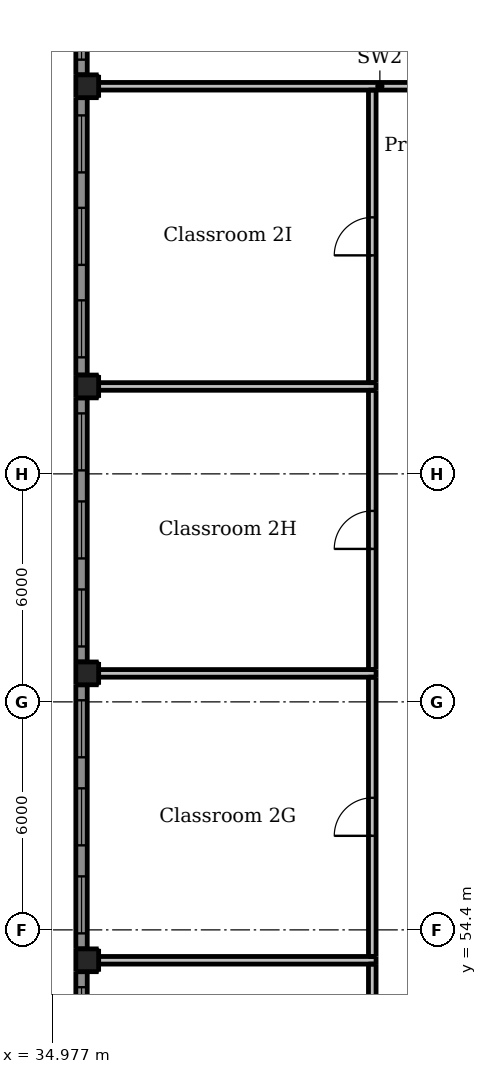
"""IFC4 building model, lengths in metres.
Left out: names, types, materials, properties, quantities, classifications, styles, units other than length and angle.
Written with IfcOpenShell. Run it as: python <this file> out.ifc"""

import sys

from ifc_helpers import new_model, si_unit, direction, frame, frame_2d, origin, origin_2d, place, context, subcontext, project, spatial, rectangle, extrude, element, fill, save


model = new_model("IFC4")
c1 = context("Model", 3, precision=1e-05, world=origin(), true_north=direction((0.0, 1.0)))
c2 = subcontext(c1, "Body", "Model", "MODEL_VIEW")
j1 = project(units=[si_unit("LENGTHUNIT", "METRE"), si_unit("PLANEANGLEUNIT", "RADIAN")], contexts=[c1])
p1 = place(None, origin())
s1 = spatial("IfcSite", under=j1, at=p1, CompositionType="ELEMENT")
p2 = place(p1, origin())
s2 = spatial("IfcBuilding", under=s1, at=p2, CompositionType="ELEMENT")
p3 = place(p2, frame((0.0, 0.0, 10.0)))
s3 = spatial("IfcBuildingStorey", under=s2, at=p3, CompositionType="ELEMENT", Elevation=10.0)
for number, where, z_axis, x_axis in (
    (1, (35.9, 53.6, -0.3), (0.0, 0.0, 1.0), (1.0, 0.0, 0.0)),
    (2, (35.9, 61.15, -0.3), (0.0, 0.0, 1.0), (1.0, 0.0, 0.0)),
    (3, (35.9, 68.7, -0.3), (0.0, 0.0, 1.0), (1.0, 0.0, 0.0)),
    (4, (35.9, 76.6, -0.3), (0.0, 0.0, 1.0), (1.0, 0.0, 0.0)),
):
    element("IfcColumn", number, at=place(p3, frame(where, z_axis=z_axis, x_axis=x_axis)), inside=s3, PredefinedType="COLUMN", context=c2, shape_type="SweptSolid", body=[
        extrude(rectangle(XDim=0.6, YDim=0.6, at=origin_2d()), origin(), (0.0, 0.0, 1.0), 4.5),
    ])
p4 = place(p3, frame((35.75, 46.35, 0.0), z_axis=(0.0, 0.0, 1.0), x_axis=(0.0, 1.0, 0.0)))
e5 = element("IfcWall", 5, at=p4, inside=s3, PredefinedType="SOLIDWALL", context=c2, shape_type="SweptSolid", body=[
    extrude(rectangle(XDim=6.95, YDim=0.3, at=frame_2d((3.475, 0.0))), origin(), (0.0, 0.0, 1.0), 3.3),
])
p5 = place(p4, frame((0.408, 0.0, 0.9)))
e6 = element("IfcOpeningElement", 6, at=p5, cuts=e5, PredefinedType="OPENING", context=c2, shape_type="SweptSolid", body=[
    extrude(rectangle(XDim=1.5, YDim=1.5, at=frame_2d((0.75, 0.75))), frame((0.0, 0.16, 0.0), z_axis=(0.0, -1.0, 0.0), x_axis=(1.0, 0.0, 0.0)), (0.0, 0.0, 1.0), 0.32),
])
p6 = place(p4, frame((2.725, 0.0, 0.9)))
e7 = element("IfcOpeningElement", 7, at=p6, cuts=e5, PredefinedType="OPENING", context=c2, shape_type="SweptSolid", body=[
    extrude(rectangle(XDim=1.5, YDim=1.5, at=frame_2d((0.75, 0.75))), frame((0.0, 0.16, 0.0), z_axis=(0.0, -1.0, 0.0), x_axis=(1.0, 0.0, 0.0)), (0.0, 0.0, 1.0), 0.32),
])
p7 = place(p4, frame((5.042, 0.0, 0.9)))
e8 = element("IfcOpeningElement", 8, at=p7, cuts=e5, PredefinedType="OPENING", context=c2, shape_type="SweptSolid", body=[
    extrude(rectangle(XDim=1.5, YDim=1.5, at=frame_2d((0.75, 0.75))), frame((0.0, 0.16, 0.0), z_axis=(0.0, -1.0, 0.0), x_axis=(1.0, 0.0, 0.0)), (0.0, 0.0, 1.0), 0.32),
])
p8 = place(p3, frame((35.75, 53.9, 0.0), z_axis=(0.0, 0.0, 1.0), x_axis=(0.0, 1.0, 0.0)))
e9 = element("IfcWall", 9, at=p8, inside=s3, PredefinedType="SOLIDWALL", context=c2, shape_type="SweptSolid", body=[
    extrude(rectangle(XDim=6.95, YDim=0.3, at=frame_2d((3.475, 0.0))), origin(), (0.0, 0.0, 1.0), 3.3),
])
p9 = place(p8, frame((0.408, 0.0, 0.9)))
e10 = element("IfcOpeningElement", 10, at=p9, cuts=e9, PredefinedType="OPENING", context=c2, shape_type="SweptSolid", body=[
    extrude(rectangle(XDim=1.5, YDim=1.5, at=frame_2d((0.75, 0.75))), frame((0.0, 0.16, 0.0), z_axis=(0.0, -1.0, 0.0), x_axis=(1.0, 0.0, 0.0)), (0.0, 0.0, 1.0), 0.32),
])
p10 = place(p8, frame((2.725, 0.0, 0.9)))
e11 = element("IfcOpeningElement", 11, at=p10, cuts=e9, PredefinedType="OPENING", context=c2, shape_type="SweptSolid", body=[
    extrude(rectangle(XDim=1.5, YDim=1.5, at=frame_2d((0.75, 0.75))), frame((0.0, 0.16, 0.0), z_axis=(0.0, -1.0, 0.0), x_axis=(1.0, 0.0, 0.0)), (0.0, 0.0, 1.0), 0.32),
])
p11 = place(p8, frame((5.042, 0.0, 0.9)))
e12 = element("IfcOpeningElement", 12, at=p11, cuts=e9, PredefinedType="OPENING", context=c2, shape_type="SweptSolid", body=[
    extrude(rectangle(XDim=1.5, YDim=1.5, at=frame_2d((0.75, 0.75))), frame((0.0, 0.16, 0.0), z_axis=(0.0, -1.0, 0.0), x_axis=(1.0, 0.0, 0.0)), (0.0, 0.0, 1.0), 0.32),
])
p12 = place(p3, frame((35.75, 61.45, 0.0), z_axis=(0.0, 0.0, 1.0), x_axis=(0.0, 1.0, 0.0)))
e13 = element("IfcWall", 13, at=p12, inside=s3, PredefinedType="SOLIDWALL", context=c2, shape_type="SweptSolid", body=[
    extrude(rectangle(XDim=6.95, YDim=0.3, at=frame_2d((3.475, 0.0))), origin(), (0.0, 0.0, 1.0), 3.3),
])
p13 = place(p12, frame((0.408, 0.0, 0.9)))
e14 = element("IfcOpeningElement", 14, at=p13, cuts=e13, PredefinedType="OPENING", context=c2, shape_type="SweptSolid", body=[
    extrude(rectangle(XDim=1.5, YDim=1.5, at=frame_2d((0.75, 0.75))), frame((0.0, 0.16, 0.0), z_axis=(0.0, -1.0, 0.0), x_axis=(1.0, 0.0, 0.0)), (0.0, 0.0, 1.0), 0.32),
])
p14 = place(p12, frame((2.725, 0.0, 0.9)))
e15 = element("IfcOpeningElement", 15, at=p14, cuts=e13, PredefinedType="OPENING", context=c2, shape_type="SweptSolid", body=[
    extrude(rectangle(XDim=1.5, YDim=1.5, at=frame_2d((0.75, 0.75))), frame((0.0, 0.16, 0.0), z_axis=(0.0, -1.0, 0.0), x_axis=(1.0, 0.0, 0.0)), (0.0, 0.0, 1.0), 0.32),
])
p15 = place(p12, frame((5.042, 0.0, 0.9)))
e16 = element("IfcOpeningElement", 16, at=p15, cuts=e13, PredefinedType="OPENING", context=c2, shape_type="SweptSolid", body=[
    extrude(rectangle(XDim=1.5, YDim=1.5, at=frame_2d((0.75, 0.75))), frame((0.0, 0.16, 0.0), z_axis=(0.0, -1.0, 0.0), x_axis=(1.0, 0.0, 0.0)), (0.0, 0.0, 1.0), 0.32),
])
p16 = place(p3, frame((35.75, 69.0, 0.0), z_axis=(0.0, 0.0, 1.0), x_axis=(0.0, 1.0, 0.0)))
e17 = element("IfcWall", 17, at=p16, inside=s3, PredefinedType="SOLIDWALL", context=c2, shape_type="SweptSolid", body=[
    extrude(rectangle(XDim=7.3, YDim=0.3, at=frame_2d((3.65, 0.0))), origin(), (0.0, 0.0, 1.0), 3.3),
])
p17 = place(p16, frame((0.467, 0.0, 0.9)))
e18 = element("IfcOpeningElement", 18, at=p17, cuts=e17, PredefinedType="OPENING", context=c2, shape_type="SweptSolid", body=[
    extrude(rectangle(XDim=1.5, YDim=1.5, at=frame_2d((0.75, 0.75))), frame((0.0, 0.16, 0.0), z_axis=(0.0, -1.0, 0.0), x_axis=(1.0, 0.0, 0.0)), (0.0, 0.0, 1.0), 0.32),
])
p18 = place(p16, frame((2.9, 0.0, 0.9)))
e19 = element("IfcOpeningElement", 19, at=p18, cuts=e17, PredefinedType="OPENING", context=c2, shape_type="SweptSolid", body=[
    extrude(rectangle(XDim=1.5, YDim=1.5, at=frame_2d((0.75, 0.75))), frame((0.0, 0.16, 0.0), z_axis=(0.0, -1.0, 0.0), x_axis=(1.0, 0.0, 0.0)), (0.0, 0.0, 1.0), 0.32),
])
p19 = place(p16, frame((5.333, 0.0, 0.9)))
e20 = element("IfcOpeningElement", 20, at=p19, cuts=e17, PredefinedType="OPENING", context=c2, shape_type="SweptSolid", body=[
    extrude(rectangle(XDim=1.5, YDim=1.5, at=frame_2d((0.75, 0.75))), frame((0.0, 0.16, 0.0), z_axis=(0.0, -1.0, 0.0), x_axis=(1.0, 0.0, 0.0)), (0.0, 0.0, 1.0), 0.32),
])
p20 = place(p3, frame((35.75, 76.9, 0.0), z_axis=(0.0, 0.0, 1.0), x_axis=(0.0, 1.0, 0.0)))
e21 = element("IfcWall", 21, at=p20, inside=s3, PredefinedType="SOLIDWALL", context=c2, shape_type="SweptSolid", body=[
    extrude(rectangle(XDim=6.9, YDim=0.3, at=frame_2d((3.45, 0.0))), origin(), (0.0, 0.0, 1.0), 3.3),
])
p21 = place(p20, frame((0.4, 0.0, 0.9)))
e22 = element("IfcOpeningElement", 22, at=p21, cuts=e21, PredefinedType="OPENING", context=c2, shape_type="SweptSolid", body=[
    extrude(rectangle(XDim=1.5, YDim=1.5, at=frame_2d((0.75, 0.75))), frame((0.0, 0.16, 0.0), z_axis=(0.0, -1.0, 0.0), x_axis=(1.0, 0.0, 0.0)), (0.0, 0.0, 1.0), 0.32),
])
p22 = place(p20, frame((2.7, 0.0, 0.9)))
e23 = element("IfcOpeningElement", 23, at=p22, cuts=e21, PredefinedType="OPENING", context=c2, shape_type="SweptSolid", body=[
    extrude(rectangle(XDim=1.5, YDim=1.5, at=frame_2d((0.75, 0.75))), frame((0.0, 0.16, 0.0), z_axis=(0.0, -1.0, 0.0), x_axis=(1.0, 0.0, 0.0)), (0.0, 0.0, 1.0), 0.32),
])
p23 = place(p20, frame((5.0, 0.0, 0.9)))
e24 = element("IfcOpeningElement", 24, at=p23, cuts=e21, PredefinedType="OPENING", context=c2, shape_type="SweptSolid", body=[
    extrude(rectangle(XDim=1.5, YDim=1.5, at=frame_2d((0.75, 0.75))), frame((0.0, 0.16, 0.0), z_axis=(0.0, -1.0, 0.0), x_axis=(1.0, 0.0, 0.0)), (0.0, 0.0, 1.0), 0.32),
])
p24 = place(p3, frame((43.4, 46.15, 0.0), z_axis=(0.0, 0.0, 1.0), x_axis=(0.0, 1.0, 0.0)))
e25 = element("IfcWall", 25, at=p24, inside=s3, PredefinedType="PARTITIONING", context=c2, shape_type="SweptSolid", body=[
    extrude(rectangle(XDim=7.35, YDim=0.2, at=frame_2d((3.675, 0.0))), origin(), (0.0, 0.0, 1.0), 3.1),
])
p25 = place(p24, frame((3.175, 0.0, 0.0)))
e26 = element("IfcOpeningElement", 26, at=p25, cuts=e25, PredefinedType="OPENING", context=c2, shape_type="SweptSolid", body=[
    extrude(rectangle(XDim=1.0, YDim=2.1, at=frame_2d((0.5, 1.05))), frame((0.0, 0.11, 0.0), z_axis=(0.0, -1.0, 0.0), x_axis=(1.0, 0.0, 0.0)), (0.0, 0.0, 1.0), 0.22),
])
p26 = place(p3, frame((43.4, 53.7, 0.0), z_axis=(0.0, 0.0, 1.0), x_axis=(0.0, 1.0, 0.0)))
e27 = element("IfcWall", 27, at=p26, inside=s3, PredefinedType="PARTITIONING", context=c2, shape_type="SweptSolid", body=[
    extrude(rectangle(XDim=7.35, YDim=0.2, at=frame_2d((3.675, 0.0))), origin(), (0.0, 0.0, 1.0), 3.1),
])
p27 = place(p26, frame((3.175, 0.0, 0.0)))
e28 = element("IfcOpeningElement", 28, at=p27, cuts=e27, PredefinedType="OPENING", context=c2, shape_type="SweptSolid", body=[
    extrude(rectangle(XDim=1.0, YDim=2.1, at=frame_2d((0.5, 1.05))), frame((0.0, 0.11, 0.0), z_axis=(0.0, -1.0, 0.0), x_axis=(1.0, 0.0, 0.0)), (0.0, 0.0, 1.0), 0.22),
])
p28 = place(p3, frame((43.4, 61.25, 0.0), z_axis=(0.0, 0.0, 1.0), x_axis=(0.0, 1.0, 0.0)))
e29 = element("IfcWall", 29, at=p28, inside=s3, PredefinedType="PARTITIONING", context=c2, shape_type="SweptSolid", body=[
    extrude(rectangle(XDim=7.35, YDim=0.2, at=frame_2d((3.675, 0.0))), origin(), (0.0, 0.0, 1.0), 3.1),
])
p29 = place(p28, frame((3.175, 0.0, 0.0)))
e30 = element("IfcOpeningElement", 30, at=p29, cuts=e29, PredefinedType="OPENING", context=c2, shape_type="SweptSolid", body=[
    extrude(rectangle(XDim=1.0, YDim=2.1, at=frame_2d((0.5, 1.05))), frame((0.0, 0.11, 0.0), z_axis=(0.0, -1.0, 0.0), x_axis=(1.0, 0.0, 0.0)), (0.0, 0.0, 1.0), 0.22),
])
p30 = place(p3, frame((43.4, 68.8, 0.0), z_axis=(0.0, 0.0, 1.0), x_axis=(0.0, 1.0, 0.0)))
e31 = element("IfcWall", 31, at=p30, inside=s3, PredefinedType="PARTITIONING", context=c2, shape_type="SweptSolid", body=[
    extrude(rectangle(XDim=7.7, YDim=0.2, at=frame_2d((3.85, 0.0))), origin(), (0.0, 0.0, 1.0), 3.1),
])
p31 = place(p30, frame((3.35, 0.0, 0.0)))
e32 = element("IfcOpeningElement", 32, at=p31, cuts=e31, PredefinedType="OPENING", context=c2, shape_type="SweptSolid", body=[
    extrude(rectangle(XDim=1.0, YDim=2.1, at=frame_2d((0.5, 1.05))), frame((0.0, 0.11, 0.0), z_axis=(0.0, -1.0, 0.0), x_axis=(1.0, 0.0, 0.0)), (0.0, 0.0, 1.0), 0.22),
])
for number, where, z_axis, x_axis in (
    (33, (36.2, 53.6, 0.0), (0.0, 0.0, 1.0), (1.0, 0.0, 0.0)),
    (34, (36.2, 61.15, 0.0), (0.0, 0.0, 1.0), (1.0, 0.0, 0.0)),
    (35, (36.2, 68.7, 0.0), (0.0, 0.0, 1.0), (1.0, 0.0, 0.0)),
):
    element("IfcWall", number, at=place(p3, frame(where, z_axis=z_axis, x_axis=x_axis)), inside=s3, PredefinedType="PARTITIONING", context=c2, shape_type="SweptSolid", body=[
        extrude(rectangle(XDim=7.3, YDim=0.2, at=frame_2d((3.65, 0.0))), origin(), (0.0, 0.0, 1.0), 3.1),
    ])
p32 = place(p3, frame((36.2, 76.6, 0.0), z_axis=(0.0, 0.0, 1.0), x_axis=(1.0, 0.0, 0.0)))
e36 = element("IfcWall", 36, at=p32, inside=s3, PredefinedType="PARTITIONING", context=c2, shape_type="SweptSolid", body=[
    extrude(rectangle(XDim=14.8, YDim=0.2, at=frame_2d((7.4, 0.0))), origin(), (0.0, 0.0, 1.0), 3.1),
])
p33 = place(p32, frame((11.1, 0.0, 0.0)))
e37 = element("IfcOpeningElement", 37, at=p33, cuts=e36, PredefinedType="OPENING", context=c2, shape_type="SweptSolid", body=[
    extrude(rectangle(XDim=1.0, YDim=2.1, at=frame_2d((0.5, 1.05))), frame((0.0, 0.11, 0.0), z_axis=(0.0, -1.0, 0.0), x_axis=(1.0, 0.0, 0.0)), (0.0, 0.0, 1.0), 0.22),
])
p34 = place(p7, origin())
e38 = element("IfcWindow", 38, at=p34, inside=s3, PartitioningType="DOUBLE_PANEL_HORIZONTAL", PredefinedType="WINDOW", context=c2, shape_type="SweptSolid", body=[
    extrude(rectangle(XDim=1.5, YDim=1.5, at=frame_2d((0.75, 0.75))), frame((0.0, 0.03, 0.0), z_axis=(0.0, -1.0, 0.0), x_axis=(1.0, 0.0, 0.0)), (0.0, 0.0, 1.0), 0.06),
])
fill(e8, e38)
p35 = place(p9, origin())
e39 = element("IfcWindow", 39, at=p35, inside=s3, PartitioningType="DOUBLE_PANEL_HORIZONTAL", PredefinedType="WINDOW", context=c2, shape_type="SweptSolid", body=[
    extrude(rectangle(XDim=1.5, YDim=1.5, at=frame_2d((0.75, 0.75))), frame((0.0, 0.03, 0.0), z_axis=(0.0, -1.0, 0.0), x_axis=(1.0, 0.0, 0.0)), (0.0, 0.0, 1.0), 0.06),
])
fill(e10, e39)
p36 = place(p10, origin())
e40 = element("IfcWindow", 40, at=p36, inside=s3, PartitioningType="DOUBLE_PANEL_HORIZONTAL", PredefinedType="WINDOW", context=c2, shape_type="SweptSolid", body=[
    extrude(rectangle(XDim=1.5, YDim=1.5, at=frame_2d((0.75, 0.75))), frame((0.0, 0.03, 0.0), z_axis=(0.0, -1.0, 0.0), x_axis=(1.0, 0.0, 0.0)), (0.0, 0.0, 1.0), 0.06),
])
fill(e11, e40)
p37 = place(p11, origin())
e41 = element("IfcWindow", 41, at=p37, inside=s3, PartitioningType="DOUBLE_PANEL_HORIZONTAL", PredefinedType="WINDOW", context=c2, shape_type="SweptSolid", body=[
    extrude(rectangle(XDim=1.5, YDim=1.5, at=frame_2d((0.75, 0.75))), frame((0.0, 0.03, 0.0), z_axis=(0.0, -1.0, 0.0), x_axis=(1.0, 0.0, 0.0)), (0.0, 0.0, 1.0), 0.06),
])
fill(e12, e41)
p38 = place(p13, origin())
e42 = element("IfcWindow", 42, at=p38, inside=s3, PartitioningType="DOUBLE_PANEL_HORIZONTAL", PredefinedType="WINDOW", context=c2, shape_type="SweptSolid", body=[
    extrude(rectangle(XDim=1.5, YDim=1.5, at=frame_2d((0.75, 0.75))), frame((0.0, 0.03, 0.0), z_axis=(0.0, -1.0, 0.0), x_axis=(1.0, 0.0, 0.0)), (0.0, 0.0, 1.0), 0.06),
])
fill(e14, e42)
p39 = place(p14, origin())
e43 = element("IfcWindow", 43, at=p39, inside=s3, PartitioningType="DOUBLE_PANEL_HORIZONTAL", PredefinedType="WINDOW", context=c2, shape_type="SweptSolid", body=[
    extrude(rectangle(XDim=1.5, YDim=1.5, at=frame_2d((0.75, 0.75))), frame((0.0, 0.03, 0.0), z_axis=(0.0, -1.0, 0.0), x_axis=(1.0, 0.0, 0.0)), (0.0, 0.0, 1.0), 0.06),
])
fill(e15, e43)
p40 = place(p15, origin())
e44 = element("IfcWindow", 44, at=p40, inside=s3, PartitioningType="DOUBLE_PANEL_HORIZONTAL", PredefinedType="WINDOW", context=c2, shape_type="SweptSolid", body=[
    extrude(rectangle(XDim=1.5, YDim=1.5, at=frame_2d((0.75, 0.75))), frame((0.0, 0.03, 0.0), z_axis=(0.0, -1.0, 0.0), x_axis=(1.0, 0.0, 0.0)), (0.0, 0.0, 1.0), 0.06),
])
fill(e16, e44)
p41 = place(p17, origin())
e45 = element("IfcWindow", 45, at=p41, inside=s3, PartitioningType="DOUBLE_PANEL_HORIZONTAL", PredefinedType="WINDOW", context=c2, shape_type="SweptSolid", body=[
    extrude(rectangle(XDim=1.5, YDim=1.5, at=frame_2d((0.75, 0.75))), frame((0.0, 0.03, 0.0), z_axis=(0.0, -1.0, 0.0), x_axis=(1.0, 0.0, 0.0)), (0.0, 0.0, 1.0), 0.06),
])
fill(e18, e45)
p42 = place(p18, origin())
e46 = element("IfcWindow", 46, at=p42, inside=s3, PartitioningType="DOUBLE_PANEL_HORIZONTAL", PredefinedType="WINDOW", context=c2, shape_type="SweptSolid", body=[
    extrude(rectangle(XDim=1.5, YDim=1.5, at=frame_2d((0.75, 0.75))), frame((0.0, 0.03, 0.0), z_axis=(0.0, -1.0, 0.0), x_axis=(1.0, 0.0, 0.0)), (0.0, 0.0, 1.0), 0.06),
])
fill(e19, e46)
p43 = place(p19, origin())
e47 = element("IfcWindow", 47, at=p43, inside=s3, PartitioningType="DOUBLE_PANEL_HORIZONTAL", PredefinedType="WINDOW", context=c2, shape_type="SweptSolid", body=[
    extrude(rectangle(XDim=1.5, YDim=1.5, at=frame_2d((0.75, 0.75))), frame((0.0, 0.03, 0.0), z_axis=(0.0, -1.0, 0.0), x_axis=(1.0, 0.0, 0.0)), (0.0, 0.0, 1.0), 0.06),
])
fill(e20, e47)
p44 = place(p21, origin())
e48 = element("IfcWindow", 48, at=p44, inside=s3, PartitioningType="DOUBLE_PANEL_HORIZONTAL", PredefinedType="WINDOW", context=c2, shape_type="SweptSolid", body=[
    extrude(rectangle(XDim=1.5, YDim=1.5, at=frame_2d((0.75, 0.75))), frame((0.0, 0.03, 0.0), z_axis=(0.0, -1.0, 0.0), x_axis=(1.0, 0.0, 0.0)), (0.0, 0.0, 1.0), 0.06),
])
fill(e22, e48)
p45 = place(p27, origin())
e49 = element("IfcDoor", 49, at=p45, inside=s3, OperationType="SINGLE_SWING_LEFT", PredefinedType="DOOR", context=c2, shape_type="SweptSolid", body=[
    extrude(rectangle(XDim=1.0, YDim=2.1, at=frame_2d((0.5, 1.05))), frame((0.0, 0.025, 0.0), z_axis=(0.0, -1.0, 0.0), x_axis=(1.0, 0.0, 0.0)), (0.0, 0.0, 1.0), 0.05),
])
fill(e28, e49)
p46 = place(p29, origin())
e50 = element("IfcDoor", 50, at=p46, inside=s3, OperationType="SINGLE_SWING_LEFT", PredefinedType="DOOR", context=c2, shape_type="SweptSolid", body=[
    extrude(rectangle(XDim=1.0, YDim=2.1, at=frame_2d((0.5, 1.05))), frame((0.0, 0.025, 0.0), z_axis=(0.0, -1.0, 0.0), x_axis=(1.0, 0.0, 0.0)), (0.0, 0.0, 1.0), 0.05),
])
fill(e30, e50)
p47 = place(p31, origin())
e51 = element("IfcDoor", 51, at=p47, inside=s3, OperationType="SINGLE_SWING_LEFT", PredefinedType="DOOR", context=c2, shape_type="SweptSolid", body=[
    extrude(rectangle(XDim=1.0, YDim=2.1, at=frame_2d((0.5, 1.05))), frame((0.0, 0.025, 0.0), z_axis=(0.0, -1.0, 0.0), x_axis=(1.0, 0.0, 0.0)), (0.0, 0.0, 1.0), 0.05),
])
fill(e32, e51)
save(model, sys.argv[1])
